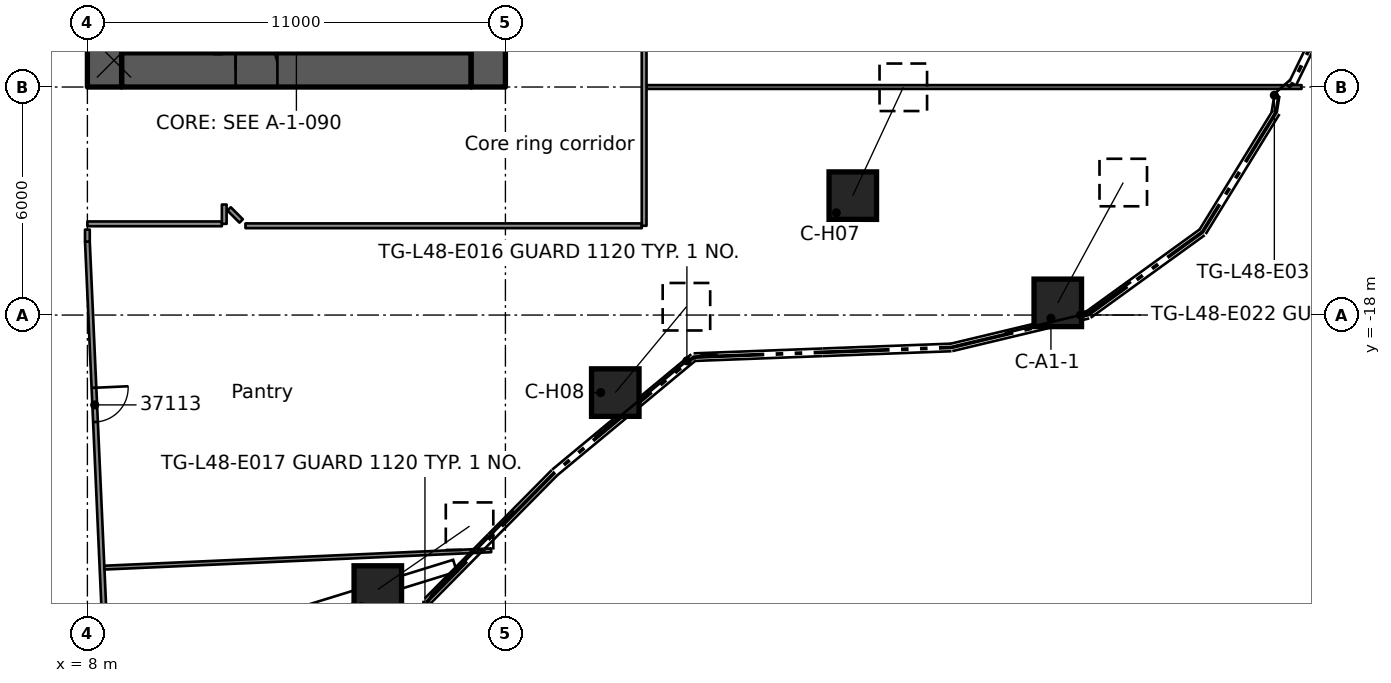
"""IFC4 building model, lengths in metres.
Left out: names, types, materials, properties, quantities, classifications, styles, units other than length and angle.
Written with IfcOpenShell. Run it as: python <this file> out.ifc"""

import sys

from ifc_helpers import new_model, si_unit, direction, frame, frame_2d, origin, origin_2d, place, context, subcontext, project, spatial, rectangle, extrude, element, fill, save


model = new_model("IFC4")
c1 = context("Model", 3, precision=1e-05, world=origin(), true_north=direction((0.0, 1.0)))
c2 = subcontext(c1, "Body", "Model", "MODEL_VIEW")
j1 = project(units=[si_unit("LENGTHUNIT", "METRE"), si_unit("PLANEANGLEUNIT", "RADIAN")], contexts=[c1])
p1 = place(None, origin())
s1 = spatial("IfcSite", under=j1, at=p1, CompositionType="ELEMENT")
p2 = place(p1, origin())
s2 = spatial("IfcBuilding", under=s1, at=p2, CompositionType="ELEMENT")
p3 = place(p2, frame((0.0, 0.0, 184.6)))
s3 = spatial("IfcBuildingStorey", under=s2, at=p3, CompositionType="ELEMENT", Elevation=184.6)
p4 = place(p3, frame((8.9, -11.55, 0.0), z_axis=(0.0, 0.0, 1.0), x_axis=(1.0, 0.0, 0.0)))
e1 = element("IfcWall", 1, at=p4, inside=s3, PredefinedType="SHEAR", context=c2, shape_type="SweptSolid", body=[
    extrude(rectangle(XDim=9.2, YDim=0.9, at=frame_2d((4.6, 0.0))), origin(), (0.0, 0.0, 1.0), 4.0),
])
p5 = place(p4, frame((3.0, 0.0, 0.0)))
e2 = element("IfcOpeningElement", 2, at=p5, cuts=e1, PredefinedType="OPENING", context=c2, shape_type="SweptSolid", body=[
    extrude(rectangle(XDim=1.1, YDim=2.1, at=frame_2d((0.55, 1.05))), frame((0.0, 0.46, 0.0), z_axis=(0.0, -1.0, 0.0), x_axis=(1.0, 0.0, 0.0)), (0.0, 0.0, 1.0), 0.92),
])
p6 = place(p3, frame((8.45, -12.0, 0.0), z_axis=(0.0, 0.0, 1.0), x_axis=(0.0, 1.0, 0.0)))
e3 = element("IfcWall", 3, at=p6, inside=s3, PredefinedType="SHEAR", context=c2, shape_type="SweptSolid", body=[
    extrude(rectangle(XDim=24.0, YDim=0.9, at=frame_2d((12.0, 0.0))), origin(), (0.0, 0.0, 1.0), 4.0),
])
p7 = place(p6, frame((12.6, 0.0, 0.0)))
e4 = element("IfcOpeningElement", 4, at=p7, cuts=e3, PredefinedType="OPENING", context=c2, shape_type="SweptSolid", body=[
    extrude(rectangle(XDim=1.8, YDim=2.1, at=frame_2d((0.9, 1.05))), frame((0.0, 0.46, 0.0), z_axis=(0.0, -1.0, 0.0), x_axis=(1.0, 0.0, 0.0)), (0.0, 0.0, 1.0), 0.92),
])
p8 = place(p6, frame((3.25, 0.0, 0.0)))
e5 = element("IfcOpeningElement", 5, at=p8, cuts=e3, PredefinedType="OPENING", context=c2, shape_type="SweptSolid", body=[
    extrude(rectangle(XDim=1.1, YDim=2.1, at=frame_2d((0.55, 1.05))), frame((0.0, 0.46, 0.0), z_axis=(0.0, -1.0, 0.0), x_axis=(1.0, 0.0, 0.0)), (0.0, 0.0, 1.0), 0.92),
])
p9 = place(p3, frame((18.55, -12.0, 0.0), z_axis=(0.0, 0.0, 1.0), x_axis=(0.0, 1.0, 0.0)))
e6 = element("IfcWall", 6, at=p9, inside=s3, PredefinedType="SHEAR", context=c2, shape_type="SweptSolid", body=[
    extrude(rectangle(XDim=24.0, YDim=0.9, at=frame_2d((12.0, 0.0))), origin(), (0.0, 0.0, 1.0), 4.0),
])
p10 = place(p9, frame((12.1, 0.0, 0.0)))
e7 = element("IfcOpeningElement", 7, at=p10, cuts=e6, PredefinedType="OPENING", context=c2, shape_type="SweptSolid", body=[
    extrude(rectangle(XDim=1.8, YDim=2.1, at=frame_2d((0.9, 1.05))), frame((0.0, 0.46, 0.0), z_axis=(0.0, -1.0, 0.0), x_axis=(1.0, 0.0, 0.0)), (0.0, 0.0, 1.0), 0.92),
])
p11 = place(p3, frame((33.535, -17.679, 0.477), z_axis=(0.365175306665, 0.670954006353, 0.645343100034), x_axis=(-0.878335237857, 0.478045196545, 0.0)))
e8 = element("IfcColumn", 8, at=p11, inside=s3, PredefinedType="COLUMN", context=c2, shape_type="SweptSolid", body=[
    extrude(rectangle(XDim=1.25, YDim=1.25, at=origin_2d()), origin(), (0.0, 0.0, 1.0), 4.719),
])
p12 = place(p3, frame((28.141, -14.858, 0.444), z_axis=(0.300373402151, 0.644398349607, 0.703225843029), x_axis=(-0.906369453424, 0.422485992548, 0.0)))
e9 = element("IfcColumn", 9, at=p12, inside=s3, PredefinedType="COLUMN", context=c2, shape_type="SweptSolid", body=[
    extrude(rectangle(XDim=1.25, YDim=1.25, at=origin_2d()), origin(), (0.0, 0.0, 1.0), 4.424),
])
p13 = place(p3, frame((21.891, -20.04, 0.426), z_axis=(0.435014288801, 0.525001593097, 0.731529832464), x_axis=(-0.770012215965, 0.638029142959, 0.0)))
e10 = element("IfcColumn", 10, at=p13, inside=s3, PredefinedType="COLUMN", context=c2, shape_type="SweptSolid", body=[
    extrude(rectangle(XDim=1.25, YDim=1.25, at=origin_2d()), origin(), (0.0, 0.0, 1.0), 4.303),
])
p14 = place(p3, frame((15.642, -25.222, 0.426), z_axis=(0.560997790025, 0.387427218599, 0.731561091007), x_axis=(-0.568261831794, 0.82284779305, 0.0)))
e11 = element("IfcColumn", 11, at=p14, inside=s3, PredefinedType="COLUMN", context=c2, shape_type="SweptSolid", body=[
    extrude(rectangle(XDim=1.25, YDim=1.25, at=origin_2d()), origin(), (0.0, 0.0, 1.0), 4.303),
])
p15 = place(p3, frame((11.44, -6.975, 0.0), z_axis=(0.0, 0.0, 1.0), x_axis=(0.0, -1.0, 0.0)))
e12 = element("IfcWall", 12, at=p15, inside=s3, PredefinedType="SOLIDWALL", context=c2, shape_type="SweptSolid", body=[
    extrude(rectangle(XDim=4.125, YDim=0.2, at=frame_2d((2.062, 0.0))), origin(), (0.0, 0.0, 1.0), 3.58),
])
p16 = place(p15, frame((2.1, 0.0, 0.0)))
e13 = element("IfcOpeningElement", 13, at=p16, cuts=e12, PredefinedType="OPENING", context=c2, shape_type="SweptSolid", body=[
    extrude(rectangle(XDim=1.1, YDim=2.1, at=frame_2d((0.55, 1.05))), frame((0.0, 0.11, 0.0), z_axis=(0.0, -1.0, 0.0), x_axis=(1.0, 0.0, 0.0)), (0.0, 0.0, 1.0), 0.22),
])
p17 = place(p3, frame((8.0, -16.068, 0.0), z_axis=(0.0, 0.0, 1.0), x_axis=(0.044822961231, -0.998994946006, 0.0)))
e14 = element("IfcWall", 14, at=p17, inside=s3, PredefinedType="PARTITIONING", context=c2, shape_type="SweptSolid", body=[
    extrude(rectangle(XDim=17.179, YDim=0.125, at=frame_2d((8.59, 0.0))), origin(), (0.0, 0.0, 1.0), 3.56),
])
p18 = place(p17, frame((12.19, 0.0, 0.0)))
e15 = element("IfcOpeningElement", 15, at=p18, cuts=e14, PredefinedType="OPENING", context=c2, shape_type="SweptSolid", body=[
    extrude(rectangle(XDim=1.1, YDim=2.1, at=frame_2d((0.55, 1.05))), frame((0.0, 0.073, 0.0), z_axis=(0.0, -1.0, 0.0), x_axis=(1.0, 0.0, 0.0)), (0.0, 0.0, 1.0), 0.145),
])
p19 = place(p17, frame((3.85, 0.0, 0.0)))
e16 = element("IfcOpeningElement", 16, at=p19, cuts=e14, PredefinedType="OPENING", context=c2, shape_type="SweptSolid", body=[
    extrude(rectangle(XDim=0.9, YDim=2.1, at=frame_2d((0.45, 1.05))), frame((0.0, 0.073, 0.0), z_axis=(0.0, -1.0, 0.0), x_axis=(1.0, 0.0, 0.0)), (0.0, 0.0, 1.0), 0.145),
])
p20 = place(p3, frame((11.729, -15.207, 0.0), z_axis=(0.0, 0.0, 1.0), x_axis=(0.707106781187, -0.707106781187, 0.0)))
e17 = element("IfcWall", 17, at=p20, inside=s3, PredefinedType="PARTITIONING", context=c2, shape_type="SweptSolid", body=[
    extrude(rectangle(XDim=0.448, YDim=0.125, at=frame_2d((0.224, 0.0))), origin(), (0.0, 0.0, 1.0), 3.56),
])
p21 = place(p3, frame((12.16, -15.651, 0.0), z_axis=(0.0, 0.0, 1.0), x_axis=(1.0, 0.0, 0.0)))
e18 = element("IfcWall", 18, at=p21, inside=s3, PredefinedType="PARTITIONING", context=c2, shape_type="SweptSolid", body=[
    extrude(rectangle(XDim=10.427, YDim=0.125, at=frame_2d((5.213, 0.0))), origin(), (0.0, 0.0, 1.0), 3.56),
])
p22 = place(p3, frame((8.0, -15.6, 0.0), z_axis=(0.0, 0.0, 1.0), x_axis=(1.0, 0.0, 0.0)))
e19 = element("IfcWall", 19, at=p22, inside=s3, PredefinedType="PARTITIONING", context=c2, shape_type="SweptSolid", body=[
    extrude(rectangle(XDim=3.539, YDim=0.125, at=frame_2d((1.77, 0.0))), origin(), (0.0, 0.0, 1.0), 3.56),
])
p23 = place(p3, frame((22.712, -12.0, 0.0), z_axis=(0.0, 0.0, 1.0), x_axis=(1.0, 0.0, 0.0)))
e20 = element("IfcWall", 20, at=p23, inside=s3, PredefinedType="PARTITIONING", context=c2, shape_type="SweptSolid", body=[
    extrude(rectangle(XDim=17.237, YDim=0.1, at=frame_2d((8.619, 0.0))), origin(), (0.0, 0.0, 1.0), 3.56),
])
p24 = place(p3, frame((8.447, -24.646, 0.0), z_axis=(0.0, 0.0, 1.0), x_axis=(0.998997247229, 0.044771643143, 0.0)))
e21 = element("IfcWall", 21, at=p24, inside=s3, PredefinedType="PARTITIONING", context=c2, shape_type="SweptSolid", body=[
    extrude(rectangle(XDim=10.186, YDim=0.1, at=frame_2d((5.093, 0.0))), origin(), (0.0, 0.0, 1.0), 3.56),
])
p25 = place(p3, frame((22.65, 15.651, 0.0), z_axis=(0.0, 0.0, 1.0), x_axis=(0.0, -1.0, 0.0)))
e22 = element("IfcWall", 22, at=p25, inside=s3, PredefinedType="PARTITIONING", context=c2, shape_type="SweptSolid", body=[
    extrude(rectangle(XDim=31.302, YDim=0.125, at=frame_2d((15.651, 0.0))), origin(), (0.0, 0.0, 1.0), 3.56),
])
p26 = place(p25, frame((20.751, 0.0, 0.0)))
e23 = element("IfcOpeningElement", 23, at=p26, cuts=e22, PredefinedType="OPENING", context=c2, shape_type="SweptSolid", body=[
    extrude(rectangle(XDim=1.8, YDim=2.1, at=frame_2d((0.9, 1.05))), frame((0.0, 0.073, 0.0), z_axis=(0.0, -1.0, 0.0), x_axis=(1.0, 0.0, 0.0)), (0.0, 0.0, 1.0), 0.145),
])
p27 = place(p25, frame((8.751, 0.0, 0.0)))
e24 = element("IfcOpeningElement", 24, at=p27, cuts=e22, PredefinedType="OPENING", context=c2, shape_type="SweptSolid", body=[
    extrude(rectangle(XDim=1.8, YDim=2.1, at=frame_2d((0.9, 1.05))), frame((0.0, 0.073, 0.0), z_axis=(0.0, -1.0, 0.0), x_axis=(1.0, 0.0, 0.0)), (0.0, 0.0, 1.0), 0.145),
])
p28 = place(p25, frame((1.35, 0.0, 0.0)))
e25 = element("IfcOpeningElement", 25, at=p28, cuts=e22, PredefinedType="OPENING", context=c2, shape_type="SweptSolid", body=[
    extrude(rectangle(XDim=0.9, YDim=2.1, at=frame_2d((0.45, 1.05))), frame((0.0, 0.073, 0.0), z_axis=(0.0, -1.0, 0.0), x_axis=(1.0, 0.0, 0.0)), (0.0, 0.0, 1.0), 0.145),
])
p29 = place(p3, frame((11.601, -15.6, 0.0), z_axis=(0.0, 0.0, 1.0), x_axis=(0.0, 1.0, 0.0)))
e26 = element("IfcWall", 26, at=p29, inside=s3, PredefinedType="PARTITIONING", context=c2, shape_type="SweptSolid", body=[
    extrude(rectangle(XDim=0.508, YDim=0.125, at=frame_2d((0.254, 0.0))), origin(), (0.0, 0.0, 1.0), 3.56),
])
p30 = place(p3, frame((8.0, -16.068, 0.0), z_axis=(0.0, 0.0, 1.0), x_axis=(0.0, 1.0, 0.0)))
e27 = element("IfcWall", 27, at=p30, inside=s3, PredefinedType="PARTITIONING", context=c2, shape_type="SweptSolid", body=[
    extrude(rectangle(XDim=0.316, YDim=0.125, at=frame_2d((0.158, 0.0))), origin(), (0.0, 0.0, 1.0), 3.56),
])
p31 = place(p5, origin())
e28 = element("IfcDoor", 28, at=p31, inside=s3, OperationType="SINGLE_SWING_LEFT", PredefinedType="DOOR", context=c2, shape_type="SweptSolid", body=[
    extrude(rectangle(XDim=1.1, YDim=2.1, at=frame_2d((0.55, 1.05))), frame((0.0, 0.025, 0.0), z_axis=(0.0, -1.0, 0.0), x_axis=(1.0, 0.0, 0.0)), (0.0, 0.0, 1.0), 0.05),
])
fill(e2, e28)
p32 = place(p19, origin())
e29 = element("IfcDoor", 29, at=p32, inside=s3, OperationType="SINGLE_SWING_LEFT", PredefinedType="DOOR", context=c2, shape_type="SweptSolid", body=[
    extrude(rectangle(XDim=0.9, YDim=2.1, at=frame_2d((0.45, 1.05))), frame((0.0, 0.025, 0.0), z_axis=(0.0, -1.0, 0.0), x_axis=(1.0, 0.0, 0.0)), (0.0, 0.0, 1.0), 0.05),
])
fill(e16, e29)
save(model, sys.argv[1])
